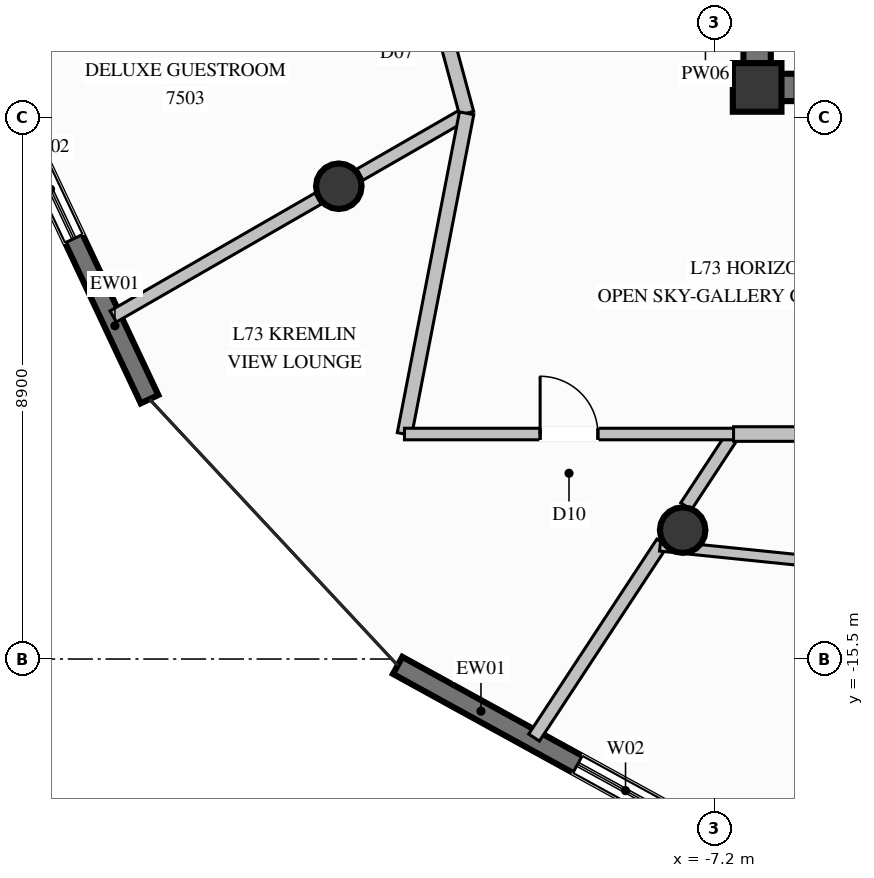
"""IFC4 building model, lengths in metres.
Left out: names, types, materials, properties, quantities, classifications, styles, units other than length and angle.
Written with IfcOpenShell. Run it as: python <this file> out.ifc"""

import sys

from ifc_helpers import new_model, si_unit, direction, frame, frame_2d, origin, origin_2d, place, context, subcontext, project, spatial, rectangle, circle, extrude, element, fill, save


model = new_model("IFC4")
c1 = context("Model", 3, precision=1e-05, world=origin(), true_north=direction((0.0, 1.0)))
c2 = subcontext(c1, "Body", "Model", "MODEL_VIEW")
j1 = project(units=[si_unit("LENGTHUNIT", "METRE"), si_unit("PLANEANGLEUNIT", "RADIAN")], contexts=[c1])
p1 = place(None, origin())
s1 = spatial("IfcSite", under=j1, at=p1, CompositionType="ELEMENT")
p2 = place(p1, origin())
s2 = spatial("IfcBuilding", under=s1, at=p2, CompositionType="ELEMENT")
p3 = place(p2, frame((0.0, 0.0, 282.0)))
s3 = spatial("IfcBuildingStorey", under=s2, at=p3, CompositionType="ELEMENT", Elevation=282.0)
p4 = place(p3, frame((-6.5, -6.1, 0.0), z_axis=(0.0, 0.0, 1.0), x_axis=(1.0, 0.0, 0.0)))
e1 = element("IfcColumn", 1, at=p4, inside=s3, PredefinedType="COLUMN", context=c2, shape_type="SweptSolid", body=[
    extrude(rectangle(XDim=0.8, YDim=0.8, at=origin_2d()), origin(), (0.0, 0.0, 1.0), 3.8),
])
p5 = place(p3, frame((-6.275, -6.1, 0.0), z_axis=(0.0, 0.0, 1.0), x_axis=(1.0, 0.0, 0.0)))
e2 = element("IfcWall", 2, at=p5, inside=s3, PredefinedType="SHEAR", context=c2, shape_type="SweptSolid", body=[
    extrude(rectangle(XDim=0.425, YDim=0.45, at=frame_2d((0.212, 0.0))), origin(), (0.0, 0.0, 1.0), 3.8),
])
p6 = place(p3, frame((-6.5, -6.325, 0.0), z_axis=(0.0, 0.0, 1.0), x_axis=(0.0, 1.0, 0.0)))
e3 = element("IfcWall", 3, at=p6, inside=s3, PredefinedType="SHEAR", context=c2, shape_type="SweptSolid", body=[
    extrude(rectangle(XDim=2.975, YDim=0.45, at=frame_2d((1.487, 0.0))), origin(), (0.0, 0.0, 1.0), 3.8),
])
for number, where, z_axis, x_axis in (
    (4, (-13.38, -7.725, 0.0), (0.0, 0.0, 1.0), (1.0, 0.0, 0.0)),
    (5, (-7.725, -13.38, 0.0), (0.0, 0.0, 1.0), (1.0, 0.0, 0.0)),
):
    element("IfcColumn", number, at=place(p3, frame(where, z_axis=z_axis, x_axis=x_axis)), inside=s3, PredefinedType="COLUMN", context=c2, shape_type="SweptSolid", body=[
        extrude(circle(Radius=0.375, at=origin_2d()), origin(), (0.0, 0.0, 1.0), 3.8),
    ])
p7 = place(p3, frame((-16.493, -11.227, 0.0), z_axis=(0.0, 0.0, 1.0), x_axis=(-0.4262165229, 0.904621177956, 0.0)))
e6 = element("IfcWall", 6, at=p7, inside=s3, PredefinedType="SOLIDWALL", context=c2, shape_type="SweptSolid", body=[
    extrude(rectangle(XDim=6.053, YDim=0.32, at=frame_2d((3.027, 0.0))), origin(), (0.0, 0.0, 1.0), 3.57),
])
p8 = place(p7, frame((2.919, 0.0, 0.35)))
e7 = element("IfcOpeningElement", 7, at=p8, cuts=e6, PredefinedType="OPENING", context=c2, shape_type="SweptSolid", body=[
    extrude(rectangle(XDim=1.8, YDim=2.6, at=frame_2d((0.9, 1.3))), frame((0.0, 0.17, 0.0), z_axis=(0.0, -1.0, 0.0), x_axis=(1.0, 0.0, 0.0)), (0.0, 0.0, 1.0), 0.34),
])
p9 = place(p3, frame((-7.228, -18.454, 0.0), z_axis=(0.0, 0.0, 1.0), x_axis=(-0.876367486065, 0.481643051822, 0.0)))
e8 = element("IfcWall", 8, at=p9, inside=s3, PredefinedType="SOLIDWALL", context=c2, shape_type="SweptSolid", body=[
    extrude(rectangle(XDim=5.916, YDim=0.32, at=frame_2d((2.958, 0.0))), origin(), (0.0, 0.0, 1.0), 3.57),
])
p10 = place(p9, frame((0.739, 0.0, 0.35)))
e9 = element("IfcOpeningElement", 9, at=p10, cuts=e8, PredefinedType="OPENING", context=c2, shape_type="SweptSolid", body=[
    extrude(rectangle(XDim=1.8, YDim=2.6, at=frame_2d((0.9, 1.3))), frame((0.0, 0.17, 0.0), z_axis=(0.0, -1.0, 0.0), x_axis=(1.0, 0.0, 0.0)), (0.0, 0.0, 1.0), 0.34),
])
p11 = place(p3, frame((-11.278, -6.525, 0.0), z_axis=(0.0, 0.0, 1.0), x_axis=(-0.866822958738, -0.498616042867, 0.0)))
e10 = element("IfcWall", 10, at=p11, inside=s3, PredefinedType="PARTITIONING", context=c2, shape_type="SweptSolid", body=[
    extrude(rectangle(XDim=2.026, YDim=0.21, at=frame_2d((1.013, 0.0))), origin(), (0.0, 0.0, 1.0), 3.085),
])
p12 = place(p3, frame((-13.719, -7.928, 0.0), z_axis=(0.0, 0.0, 1.0), x_axis=(-0.866841187991, -0.49858435074, 0.0)))
e11 = element("IfcWall", 11, at=p12, inside=s3, PredefinedType="PARTITIONING", context=c2, shape_type="SweptSolid", body=[
    extrude(rectangle(XDim=3.889, YDim=0.21, at=frame_2d((1.944, 0.0))), origin(), (0.0, 0.0, 1.0), 3.57),
])
p13 = place(p3, frame((-12.277, -2.827, 0.0), z_axis=(0.0, 0.0, 1.0), x_axis=(0.260803073576, -0.965392022348, 0.0)))
e12 = element("IfcWall", 12, at=p13, inside=s3, PredefinedType="PARTITIONING", context=c2, shape_type="SweptSolid", body=[
    extrude(rectangle(XDim=3.831, YDim=0.24, at=frame_2d((1.915, 0.0))), origin(), (0.0, 0.0, 1.0), 3.57),
])
p14 = place(p13, frame((1.415, 0.0, 0.0)))
e13 = element("IfcOpeningElement", 13, at=p14, cuts=e12, PredefinedType="OPENING", context=c2, shape_type="SweptSolid", body=[
    extrude(rectangle(XDim=1.0, YDim=2.2, at=frame_2d((0.5, 1.1))), frame((0.0, 0.13, 0.0), z_axis=(0.0, -1.0, 0.0), x_axis=(1.0, 0.0, 0.0)), (0.0, 0.0, 1.0), 0.26),
])
p15 = place(p3, frame((-6.888, -11.8, 0.0), z_axis=(0.0, 0.0, 1.0), x_axis=(-0.549023768368, -0.835806737091, 0.0)))
e14 = element("IfcWall", 14, at=p15, inside=s3, PredefinedType="PARTITIONING", context=c2, shape_type="SweptSolid", body=[
    extrude(rectangle(XDim=1.423, YDim=0.21, at=frame_2d((0.711, 0.0))), origin(), (0.0, 0.0, 1.0), 3.085),
])
p16 = place(p3, frame((-8.062, -13.586, 0.0), z_axis=(0.0, 0.0, 1.0), x_axis=(-0.549195664532, -0.835693796829, 0.0)))
e15 = element("IfcWall", 15, at=p16, inside=s3, PredefinedType="PARTITIONING", context=c2, shape_type="SweptSolid", body=[
    extrude(rectangle(XDim=3.836, YDim=0.21, at=frame_2d((1.918, 0.0))), origin(), (0.0, 0.0, 1.0), 3.57),
])
p17 = place(p3, frame((-11.278, -6.525, 0.0), z_axis=(0.0, 0.0, 1.0), x_axis=(-0.190197086903, -0.981745928504, 0.0)))
e16 = element("IfcWall", 16, at=p17, inside=s3, PredefinedType="PARTITIONING", context=c2, shape_type="SweptSolid", body=[
    extrude(rectangle(XDim=5.373, YDim=0.24, at=frame_2d((2.687, 0.0))), origin(), (0.0, 0.0, 1.0), 3.57),
])
p18 = place(p3, frame((-12.3, -11.8, 0.0), z_axis=(0.0, 0.0, 1.0), x_axis=(1.0, 0.0, 0.0)))
e17 = element("IfcWall", 17, at=p18, inside=s3, PredefinedType="PARTITIONING", context=c2, shape_type="SweptSolid", body=[
    extrude(rectangle(XDim=5.412, YDim=0.19, at=frame_2d((2.706, 0.0))), origin(), (0.0, 0.0, 1.0), 3.57),
])
p19 = place(p18, frame((2.231, 0.0, 0.0)))
e18 = element("IfcOpeningElement", 18, at=p19, cuts=e17, PredefinedType="OPENING", context=c2, shape_type="SweptSolid", body=[
    extrude(rectangle(XDim=0.95, YDim=2.1, at=frame_2d((0.475, 1.05))), frame((0.0, 0.105, 0.0), z_axis=(0.0, -1.0, 0.0), x_axis=(1.0, 0.0, 0.0)), (0.0, 0.0, 1.0), 0.21),
])
p20 = place(p3, frame((-6.888, -11.8, 0.0), z_axis=(0.0, 0.0, 1.0), x_axis=(1.0, 0.0, 0.0)))
e19 = element("IfcWall", 19, at=p20, inside=s3, PredefinedType="PARTITIONING", context=c2, shape_type="SweptSolid", body=[
    extrude(rectangle(XDim=3.031, YDim=0.24, at=frame_2d((1.516, 0.0))), origin(), (0.0, 0.0, 1.0), 3.57),
])
p21 = place(p3, frame((-8.096, -13.638, 0.0), z_axis=(0.0, 0.0, 1.0), x_axis=(0.994794612907, -0.101900334307, 0.0)))
e20 = element("IfcWall", 20, at=p21, inside=s3, PredefinedType="PLUMBINGWALL", context=c2, shape_type="SweptSolid", body=[
    extrude(rectangle(XDim=3.711, YDim=0.175, at=frame_2d((1.855, 0.0))), origin(), (0.0, 0.0, 1.0), 3.137),
])
p22 = place(p8, origin())
e21 = element("IfcWindow", 21, at=p22, inside=s3, PartitioningType="SINGLE_PANEL", PredefinedType="WINDOW", context=c2, shape_type="SweptSolid", body=[
    extrude(rectangle(XDim=1.8, YDim=2.6, at=frame_2d((0.9, 1.3))), frame((0.0, 0.03, 0.0), z_axis=(0.0, -1.0, 0.0), x_axis=(1.0, 0.0, 0.0)), (0.0, 0.0, 1.0), 0.06),
])
fill(e7, e21)
p23 = place(p10, origin())
e22 = element("IfcWindow", 22, at=p23, inside=s3, PartitioningType="SINGLE_PANEL", PredefinedType="WINDOW", context=c2, shape_type="SweptSolid", body=[
    extrude(rectangle(XDim=1.8, YDim=2.6, at=frame_2d((0.9, 1.3))), frame((0.0, 0.03, 0.0), z_axis=(0.0, -1.0, 0.0), x_axis=(1.0, 0.0, 0.0)), (0.0, 0.0, 1.0), 0.06),
])
fill(e9, e22)
p24 = place(p19, origin())
e23 = element("IfcDoor", 23, at=p24, inside=s3, OperationType="SINGLE_SWING_LEFT", PredefinedType="DOOR", context=c2, shape_type="SweptSolid", body=[
    extrude(rectangle(XDim=0.95, YDim=2.1, at=frame_2d((0.475, 1.05))), frame((0.0, 0.025, 0.0), z_axis=(0.0, -1.0, 0.0), x_axis=(1.0, 0.0, 0.0)), (0.0, 0.0, 1.0), 0.05),
])
fill(e18, e23)
save(model, sys.argv[1])
